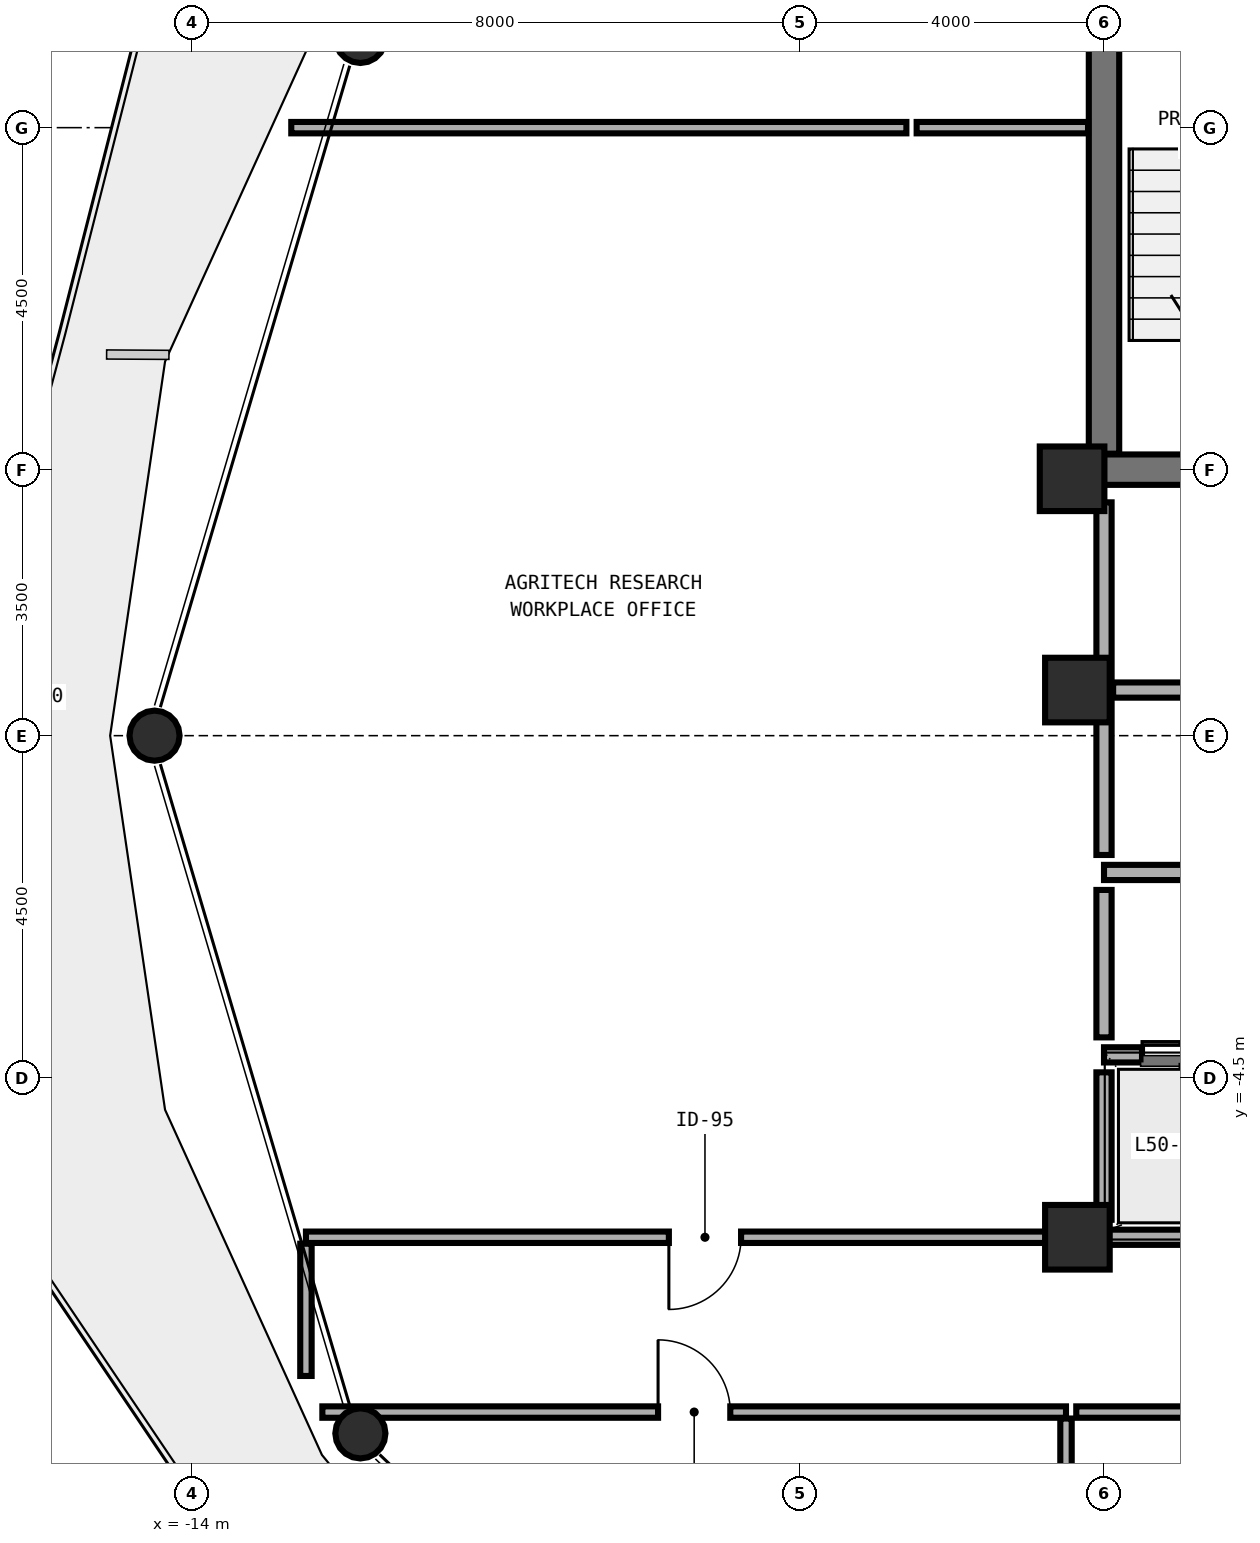
"""IFC4 building model, lengths in metres.
Left out: names, types, materials, properties, quantities, classifications, styles, units other than length and angle.
Written with IfcOpenShell. Run it as: python <this file> out.ifc"""

import sys

from ifc_helpers import new_model, si_unit, direction, frame, frame_2d, origin, origin_2d, place, context, subcontext, project, spatial, rectangle, hollow_circle, extrude, element, fill, save


model = new_model("IFC4")
c1 = context("Model", 3, precision=1e-05, world=origin(), true_north=direction((0.0, 1.0)))
c2 = subcontext(c1, "Body", "Model", "MODEL_VIEW")
j1 = project(units=[si_unit("LENGTHUNIT", "METRE"), si_unit("PLANEANGLEUNIT", "RADIAN")], contexts=[c1])
p1 = place(None, origin())
s1 = spatial("IfcSite", under=j1, at=p1, CompositionType="ELEMENT")
p2 = place(p1, origin())
s2 = spatial("IfcBuilding", under=s1, at=p2, CompositionType="ELEMENT")
p3 = place(p2, frame((0.0, 0.0, 200.4)))
s3 = spatial("IfcBuildingStorey", under=s2, at=p3, CompositionType="ELEMENT", Elevation=200.4)
p4 = place(p3, frame((-2.0, 3.5, 0.0), z_axis=(0.0, 0.0, 1.0), x_axis=(1.0, 0.0, 0.0)))
e1 = element("IfcWall", 1, at=p4, inside=s3, PredefinedType="SHEAR", context=c2, shape_type="SweptSolid", body=[
    extrude(rectangle(XDim=10.0, YDim=0.4, at=frame_2d((5.0, 0.0))), origin(), (0.0, 0.0, 1.0), 3.592),
])
p5 = place(p4, frame((1.65, 0.0, 0.0)))
e2 = element("IfcOpeningElement", 2, at=p5, cuts=e1, PredefinedType="OPENING", context=c2, shape_type="SweptSolid", body=[
    extrude(rectangle(XDim=1.1, YDim=2.15, at=frame_2d((0.55, 1.075))), frame((0.0, 0.21, 0.0), z_axis=(0.0, -1.0, 0.0), x_axis=(1.0, 0.0, 0.0)), (0.0, 0.0, 1.0), 0.42),
])
p6 = place(p4, frame((7.65, 0.0, 0.0)))
e3 = element("IfcOpeningElement", 3, at=p6, cuts=e1, PredefinedType="OPENING", context=c2, shape_type="SweptSolid", body=[
    extrude(rectangle(XDim=1.1, YDim=2.15, at=frame_2d((0.55, 1.075))), frame((0.0, 0.21, 0.0), z_axis=(0.0, -1.0, 0.0), x_axis=(1.0, 0.0, 0.0)), (0.0, 0.0, 1.0), 0.42),
])
p7 = place(p4, frame((3.72, 0.0, 0.0)))
e4 = element("IfcOpeningElement", 4, at=p7, cuts=e1, PredefinedType="OPENING", context=c2, shape_type="SweptSolid", body=[
    extrude(rectangle(XDim=1.1, YDim=2.2, at=frame_2d((0.55, 1.1))), frame((0.0, 0.21, 0.0), z_axis=(0.0, -1.0, 0.0), x_axis=(1.0, 0.0, 0.0)), (0.0, 0.0, 1.0), 0.42),
])
p8 = place(p4, frame((5.18, 0.0, 0.0)))
e5 = element("IfcOpeningElement", 5, at=p8, cuts=e1, PredefinedType="OPENING", context=c2, shape_type="SweptSolid", body=[
    extrude(rectangle(XDim=1.1, YDim=2.2, at=frame_2d((0.55, 1.1))), frame((0.0, 0.21, 0.0), z_axis=(0.0, -1.0, 0.0), x_axis=(1.0, 0.0, 0.0)), (0.0, 0.0, 1.0), 0.42),
])
p9 = place(p3, frame((-2.0, 3.71, 0.0), z_axis=(0.0, 0.0, 1.0), x_axis=(0.0, 1.0, 0.0)))
e6 = element("IfcWall", 6, at=p9, inside=s3, PredefinedType="SHEAR", context=c2, shape_type="SweptSolid", body=[
    extrude(rectangle(XDim=8.58, YDim=0.4, at=frame_2d((4.29, 0.0))), origin(), (0.0, 0.0, 1.0), 3.592),
])
for number, where, z_axis, x_axis in (
    (7, (-2.42, 3.38, 0.0), (0.0, 0.0, 1.0), (1.0, 0.0, 0.0)),
    (8, (-2.35, 0.6, 0.0), (0.0, 0.0, 1.0), (1.0, 0.0, 0.0)),
    (9, (-2.35, -6.6, 0.0), (0.0, 0.0, 1.0), (1.0, 0.0, 0.0)),
):
    element("IfcColumn", number, at=place(p3, frame(where, z_axis=z_axis, x_axis=x_axis)), inside=s3, PredefinedType="COLUMN", context=c2, shape_type="SweptSolid", body=[
        extrude(rectangle(XDim=0.85, YDim=0.85, at=origin_2d()), origin(), (0.0, 0.0, 1.0), 3.575),
    ])
p10 = place(p3, frame((-11.813, 9.189, 0.0), z_axis=(0.01645484131, -0.004711137139, 0.999853510963), x_axis=(0.275247949014, 0.961373271193, 0.0)))
e10 = element("IfcColumn", 10, at=p10, inside=s3, PredefinedType="COLUMN", context=c2, shape_type="SweptSolid", body=[
    extrude(hollow_circle(Radius=0.33, WallThickness=0.025, at=origin_2d()), origin(), (0.0, 0.0, 1.0), 3.576),
])
p11 = place(p3, frame((-14.526, 0.0, 0.0), z_axis=(0.018980464328, 0.0, 0.999819854761), x_axis=(0.0, 1.0, 0.0)))
e11 = element("IfcColumn", 11, at=p11, inside=s3, PredefinedType="COLUMN", context=c2, shape_type="SweptSolid", body=[
    extrude(hollow_circle(Radius=0.33, WallThickness=0.025, at=origin_2d()), origin(), (0.0, 0.0, 1.0), 3.576),
])
p12 = place(p3, frame((-11.813, -9.189, 0.0), z_axis=(0.01645484131, 0.004711137139, 0.999853510963), x_axis=(-0.275247949014, 0.961373271193, 0.0)))
e12 = element("IfcColumn", 12, at=p12, inside=s3, PredefinedType="COLUMN", context=c2, shape_type="SweptSolid", body=[
    extrude(hollow_circle(Radius=0.33, WallThickness=0.025, at=origin_2d()), origin(), (0.0, 0.0, 1.0), 3.576),
])
p13 = place(p3, frame((-2.0, -4.2, 0.0), z_axis=(0.0, 0.0, 1.0), x_axis=(1.0, 0.0, 0.0)))
e13 = element("IfcWall", 13, at=p13, inside=s3, PredefinedType="SOLIDWALL", context=c2, shape_type="SweptSolid", body=[
    extrude(rectangle(XDim=6.0, YDim=0.2, at=frame_2d((3.0, 0.0))), origin(), (0.0, 0.0, 1.0), 3.36),
])
p14 = place(p13, frame((0.5, 0.0, 0.0)))
e14 = element("IfcOpeningElement", 14, at=p14, cuts=e13, PredefinedType="OPENING", context=c2, shape_type="SweptSolid", body=[
    extrude(rectangle(XDim=1.0, YDim=2.2, at=frame_2d((0.5, 1.1))), frame((0.0, 0.11, 0.0), z_axis=(0.0, -1.0, 0.0), x_axis=(1.0, 0.0, 0.0)), (0.0, 0.0, 1.0), 0.22),
])
p15 = place(p13, frame((2.45, 0.0, 0.0)))
e15 = element("IfcOpeningElement", 15, at=p15, cuts=e13, PredefinedType="OPENING", context=c2, shape_type="SweptSolid", body=[
    extrude(rectangle(XDim=1.0, YDim=2.2, at=frame_2d((0.5, 1.1))), frame((0.0, 0.11, 0.0), z_axis=(0.0, -1.0, 0.0), x_axis=(1.0, 0.0, 0.0)), (0.0, 0.0, 1.0), 0.22),
])
p16 = place(p13, frame((4.4, 0.0, 0.0)))
e16 = element("IfcOpeningElement", 16, at=p16, cuts=e13, PredefinedType="OPENING", context=c2, shape_type="SweptSolid", body=[
    extrude(rectangle(XDim=1.0, YDim=2.2, at=frame_2d((0.5, 1.1))), frame((0.0, 0.11, 0.0), z_axis=(0.0, -1.0, 0.0), x_axis=(1.0, 0.0, 0.0)), (0.0, 0.0, 1.0), 0.22),
])
p17 = place(p3, frame((-2.0, -6.6, 0.0), z_axis=(0.0, 0.0, 1.0), x_axis=(1.0, 0.0, 0.0)))
e17 = element("IfcWall", 17, at=p17, inside=s3, PredefinedType="SOLIDWALL", context=c2, shape_type="SweptSolid", body=[
    extrude(rectangle(XDim=6.0, YDim=0.2, at=frame_2d((3.0, 0.0))), origin(), (0.0, 0.0, 1.0), 3.012),
])
p18 = place(p3, frame((-2.0, -6.37, 0.0), z_axis=(0.0, 0.0, 1.0), x_axis=(0.0, 1.0, 0.0)))
e18 = element("IfcWall", 18, at=p18, inside=s3, PredefinedType="SOLIDWALL", context=c2, shape_type="SweptSolid", body=[
    extrude(rectangle(XDim=1.94, YDim=0.2, at=frame_2d((0.97, 0.0))), origin(), (0.0, 0.0, 1.0), 3.012),
])
p19 = place(p3, frame((-2.0, -1.8, 0.0), z_axis=(0.0, 0.0, 1.0), x_axis=(1.0, 0.0, 0.0)))
e19 = element("IfcWall", 19, at=p19, inside=s3, PredefinedType="MOVABLE", context=c2, shape_type="SweptSolid", body=[
    extrude(rectangle(XDim=5.84, YDim=0.2, at=frame_2d((2.92, 0.0))), origin(), (0.0, 0.0, 1.0), 3.36),
])
p20 = place(p19, frame((2.4, 0.0, 0.0)))
e20 = element("IfcOpeningElement", 20, at=p20, cuts=e19, PredefinedType="OPENING", context=c2, shape_type="SweptSolid", body=[
    extrude(rectangle(XDim=1.0, YDim=2.1, at=frame_2d((0.5, 1.05))), frame((0.0, 0.11, 0.0), z_axis=(0.0, -1.0, 0.0), x_axis=(1.0, 0.0, 0.0)), (0.0, 0.0, 1.0), 0.22),
])
p21 = place(p3, frame((-12.284, -8.9, 0.0), z_axis=(0.0, 0.0, 1.0), x_axis=(1.0, 0.0, 0.0)))
e21 = element("IfcWall", 21, at=p21, inside=s3, PredefinedType="PARTITIONING", context=c2, shape_type="SweptSolid", body=[
    extrude(rectangle(XDim=9.784, YDim=0.15, at=frame_2d((4.892, 0.0))), origin(), (0.0, 0.0, 1.0), 2.842),
])
p22 = place(p21, frame((4.417, 0.0, 0.0)))
e22 = element("IfcOpeningElement", 22, at=p22, cuts=e21, PredefinedType="OPENING", context=c2, shape_type="SweptSolid", body=[
    extrude(rectangle(XDim=0.95, YDim=2.1, at=frame_2d((0.475, 1.05))), frame((0.0, 0.085, 0.0), z_axis=(0.0, -1.0, 0.0), x_axis=(1.0, 0.0, 0.0)), (0.0, 0.0, 1.0), 0.17),
])
p23 = place(p3, frame((-2.365, -8.9, 0.0), z_axis=(0.0, 0.0, 1.0), x_axis=(1.0, 0.0, 0.0)))
e23 = element("IfcWall", 23, at=p23, inside=s3, PredefinedType="PARTITIONING", context=c2, shape_type="SweptSolid", body=[
    extrude(rectangle(XDim=7.865, YDim=0.15, at=frame_2d((3.933, 0.0))), origin(), (0.0, 0.0, 1.0), 3.36),
])
p24 = place(p23, frame((3.39, 0.0, 0.0)))
e24 = element("IfcOpeningElement", 24, at=p24, cuts=e23, PredefinedType="OPENING", context=c2, shape_type="SweptSolid", body=[
    extrude(rectangle(XDim=0.95, YDim=2.1, at=frame_2d((0.475, 1.05))), frame((0.0, 0.085, 0.0), z_axis=(0.0, -1.0, 0.0), x_axis=(1.0, 0.0, 0.0)), (0.0, 0.0, 1.0), 0.17),
])
p25 = place(p3, frame((-2.16, -6.6, 0.0), z_axis=(0.0, 0.0, 1.0), x_axis=(-1.0, 0.0, 0.0)))
e25 = element("IfcWall", 25, at=p25, inside=s3, PredefinedType="PARTITIONING", context=c2, shape_type="SweptSolid", body=[
    extrude(rectangle(XDim=10.34, YDim=0.15, at=frame_2d((5.17, 0.0))), origin(), (0.0, 0.0, 1.0), 2.842),
])
p26 = place(p25, frame((4.615, 0.0, 0.0)))
e26 = element("IfcOpeningElement", 26, at=p26, cuts=e25, PredefinedType="OPENING", context=c2, shape_type="SweptSolid", body=[
    extrude(rectangle(XDim=0.95, YDim=2.1, at=frame_2d((0.475, 1.05))), frame((0.0, 0.085, 0.0), z_axis=(0.0, -1.0, 0.0), x_axis=(1.0, 0.0, 0.0)), (0.0, 0.0, 1.0), 0.17),
])
p27 = place(p3, frame((-1.88, 0.6, 0.0), z_axis=(0.0, 0.0, 1.0), x_axis=(1.0, 0.0, 0.0)))
e27 = element("IfcWall", 27, at=p27, inside=s3, PredefinedType="MOVABLE", context=c2, shape_type="SweptSolid", body=[
    extrude(rectangle(XDim=5.72, YDim=0.2, at=frame_2d((2.86, 0.0))), origin(), (0.0, 0.0, 1.0), 3.012),
])
p28 = place(p3, frame((-2.0, 0.72, 0.0), z_axis=(0.0, 0.0, 1.0), x_axis=(0.0, 1.0, 0.0)))
e28 = element("IfcWall", 28, at=p28, inside=s3, PredefinedType="MOVABLE", context=c2, shape_type="SweptSolid", body=[
    extrude(rectangle(XDim=2.35, YDim=0.2, at=frame_2d((1.175, 0.0))), origin(), (0.0, 0.0, 1.0), 2.692),
])
p29 = place(p3, frame((-2.0, -3.97, 0.0), z_axis=(0.0, 0.0, 1.0), x_axis=(0.0, 1.0, 0.0)))
e29 = element("IfcWall", 29, at=p29, inside=s3, PredefinedType="MOVABLE", context=c2, shape_type="SweptSolid", body=[
    extrude(rectangle(XDim=1.94, YDim=0.2, at=frame_2d((0.97, 0.0))), origin(), (0.0, 0.0, 1.0), 3.012),
])
p30 = place(p3, frame((-2.0, -1.57, 0.0), z_axis=(0.0, 0.0, 1.0), x_axis=(0.0, 1.0, 0.0)))
e30 = element("IfcWall", 30, at=p30, inside=s3, PredefinedType="MOVABLE", context=c2, shape_type="SweptSolid", body=[
    extrude(rectangle(XDim=2.05, YDim=0.2, at=frame_2d((1.025, 0.0))), origin(), (0.0, 0.0, 1.0), 3.012),
])
p31 = place(p3, frame((-2.5, -8.985, 0.0), z_axis=(0.0, 0.0, 1.0), x_axis=(0.0, -1.0, 0.0)))
e31 = element("IfcWall", 31, at=p31, inside=s3, PredefinedType="PARTITIONING", context=c2, shape_type="SweptSolid", body=[
    extrude(rectangle(XDim=8.209, YDim=0.15, at=frame_2d((4.104, 0.0))), origin(), (0.0, 0.0, 1.0), 2.842),
])
p32 = place(p3, frame((-12.5, -6.685, 0.0), z_axis=(0.0, 0.0, 1.0), x_axis=(0.0, -1.0, 0.0)))
e32 = element("IfcWall", 32, at=p32, inside=s3, PredefinedType="PARTITIONING", context=c2, shape_type="SweptSolid", body=[
    extrude(rectangle(XDim=1.74, YDim=0.15, at=frame_2d((0.87, 0.0))), origin(), (0.0, 0.0, 1.0), 2.942),
])
p33 = place(p3, frame((-12.693, 8.0, 0.0), z_axis=(0.0, 0.0, 1.0), x_axis=(1.0, 0.0, 0.0)))
e33 = element("IfcWall", 33, at=p33, inside=s3, PredefinedType="PARTITIONING", context=c2, shape_type="SweptSolid", body=[
    extrude(rectangle(XDim=8.093, YDim=0.15, at=frame_2d((4.046, 0.0))), origin(), (0.0, 0.0, 1.0), 3.36),
])
p34 = place(p3, frame((-4.465, 8.0, 0.0), z_axis=(0.0, 0.0, 1.0), x_axis=(1.0, 0.0, 0.0)))
e34 = element("IfcWall", 34, at=p34, inside=s3, PredefinedType="PARTITIONING", context=c2, shape_type="SweptSolid", body=[
    extrude(rectangle(XDim=2.255, YDim=0.15, at=frame_2d((1.127, 0.0))), origin(), (0.0, 0.0, 1.0), 3.36),
])
p35 = place(p22, origin())
e35 = element("IfcDoor", 35, at=p35, inside=s3, OperationType="SINGLE_SWING_LEFT", PredefinedType="DOOR", context=c2, shape_type="SweptSolid", body=[
    extrude(rectangle(XDim=0.95, YDim=2.1, at=frame_2d((0.475, 1.05))), frame((0.0, 0.025, 0.0), z_axis=(0.0, -1.0, 0.0), x_axis=(1.0, 0.0, 0.0)), (0.0, 0.0, 1.0), 0.05),
])
fill(e22, e35)
p36 = place(p26, origin())
e36 = element("IfcDoor", 36, at=p36, inside=s3, OperationType="SINGLE_SWING_RIGHT", PredefinedType="DOOR", context=c2, shape_type="SweptSolid", body=[
    extrude(rectangle(XDim=0.95, YDim=2.1, at=frame_2d((0.475, 1.05))), frame((0.0, 0.025, 0.0), z_axis=(0.0, -1.0, 0.0), x_axis=(1.0, 0.0, 0.0)), (0.0, 0.0, 1.0), 0.05),
])
fill(e26, e36)
p37 = place(p14, origin())
e37 = element("IfcDoor", 37, at=p37, inside=s3, OperationType="DOUBLE_DOOR_SLIDING", PredefinedType="DOOR", context=c2, shape_type="SweptSolid", body=[
    extrude(rectangle(XDim=1.0, YDim=2.2, at=frame_2d((0.5, 1.1))), frame((0.0, 0.025, 0.0), z_axis=(0.0, -1.0, 0.0), x_axis=(1.0, 0.0, 0.0)), (0.0, 0.0, 1.0), 0.05),
])
fill(e14, e37)
save(model, sys.argv[1])
